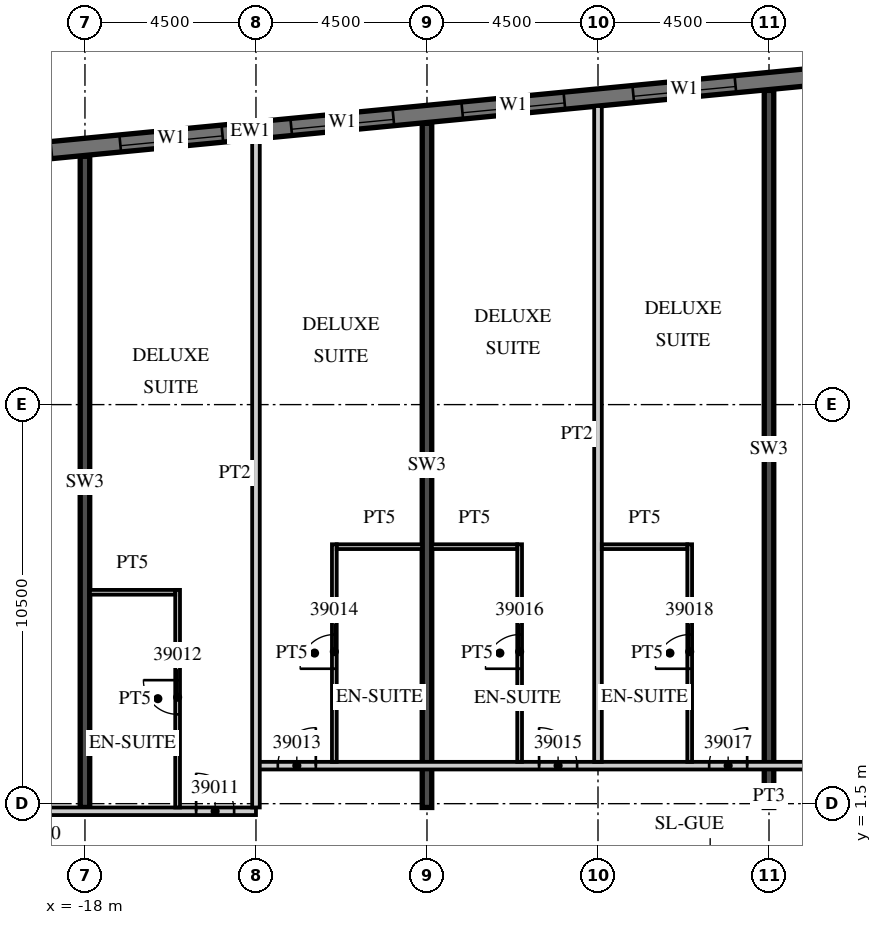
"""IFC4 building model, lengths in metres.
Left out: names, types, materials, properties, quantities, classifications, styles, units other than length and angle.
Written with IfcOpenShell. Run it as: python <this file> out.ifc"""

import sys

from ifc_helpers import new_model, si_unit, direction, frame, frame_2d, origin, place, context, subcontext, project, spatial, rectangle, extrude, element, fill, save


model = new_model("IFC4")
c1 = context("Model", 3, precision=1e-05, world=origin(), true_north=direction((0.0, 1.0)))
c2 = subcontext(c1, "Body", "Model", "MODEL_VIEW")
j1 = project(units=[si_unit("LENGTHUNIT", "METRE"), si_unit("PLANEANGLEUNIT", "RADIAN")], contexts=[c1])
p1 = place(None, origin())
s1 = spatial("IfcSite", under=j1, at=p1, CompositionType="ELEMENT")
p2 = place(p1, origin())
s2 = spatial("IfcBuilding", under=s1, at=p2, CompositionType="ELEMENT")
p3 = place(p2, frame((0.0, 0.0, 170.2)))
s3 = spatial("IfcBuildingStorey", under=s2, at=p3, CompositionType="ELEMENT", Elevation=170.2)
p4 = place(p3, frame((-18.0, 1.4, 0.0), z_axis=(0.0, 0.0, 1.0), x_axis=(0.0, 1.0, 0.0)))
e1 = element("IfcWall", 1, at=p4, inside=s3, PredefinedType="SHEAR", context=c2, shape_type="SweptSolid", body=[
    extrude(rectangle(XDim=17.134, YDim=0.25, at=frame_2d((8.567, 0.0))), origin(), (0.0, 0.0, 1.0), 3.3),
])
p5 = place(p3, frame((-9.0, 1.4, 0.0), z_axis=(0.0, 0.0, 1.0), x_axis=(0.0, 1.0, 0.0)))
e2 = element("IfcWall", 2, at=p5, inside=s3, PredefinedType="SHEAR", context=c2, shape_type="SweptSolid", body=[
    extrude(rectangle(XDim=18.001, YDim=0.25, at=frame_2d((9.0, 0.0))), origin(), (0.0, 0.0, 1.0), 3.3),
])
p6 = place(p3, frame((0.0, 1.4, 0.0), z_axis=(0.0, 0.0, 1.0), x_axis=(0.0, 1.0, 0.0)))
e3 = element("IfcWall", 3, at=p6, inside=s3, PredefinedType="SHEAR", context=c2, shape_type="SweptSolid", body=[
    extrude(rectangle(XDim=18.867, YDim=0.25, at=frame_2d((9.434, 0.0))), origin(), (0.0, 0.0, 1.0), 3.3),
])
p7 = place(p3, frame((13.521, 21.817, 0.0), z_axis=(0.0, 0.0, 1.0), x_axis=(-0.995396508751, -0.095842529008, 0.0)))
e4 = element("IfcWall", 4, at=p7, inside=s3, PredefinedType="SOLIDWALL", context=c2, shape_type="SweptSolid", body=[
    extrude(rectangle(XDim=54.591, YDim=0.45, at=frame_2d((27.296, 0.0))), origin(), (0.0, 0.0, 1.0), 3.02),
])
p8 = place(p7, frame((0.91, 0.0, 0.45)))
e5 = element("IfcOpeningElement", 5, at=p8, cuts=e4, PredefinedType="OPENING", context=c2, shape_type="SweptSolid", body=[
    extrude(rectangle(XDim=2.7, YDim=2.25, at=frame_2d((1.35, 1.125))), frame((0.0, 0.235, 0.0), z_axis=(0.0, -1.0, 0.0), x_axis=(1.0, 0.0, 0.0)), (0.0, 0.0, 1.0), 0.47),
])
p9 = place(p7, frame((5.431, 0.0, 0.45)))
e6 = element("IfcOpeningElement", 6, at=p9, cuts=e4, PredefinedType="OPENING", context=c2, shape_type="SweptSolid", body=[
    extrude(rectangle(XDim=2.7, YDim=2.25, at=frame_2d((1.35, 1.125))), frame((0.0, 0.235, 0.0), z_axis=(0.0, -1.0, 0.0), x_axis=(1.0, 0.0, 0.0)), (0.0, 0.0, 1.0), 0.47),
])
p10 = place(p7, frame((9.952, 0.0, 0.45)))
e7 = element("IfcOpeningElement", 7, at=p10, cuts=e4, PredefinedType="OPENING", context=c2, shape_type="SweptSolid", body=[
    extrude(rectangle(XDim=2.7, YDim=2.25, at=frame_2d((1.35, 1.125))), frame((0.0, 0.235, 0.0), z_axis=(0.0, -1.0, 0.0), x_axis=(1.0, 0.0, 0.0)), (0.0, 0.0, 1.0), 0.47),
])
p11 = place(p7, frame((14.473, 0.0, 0.45)))
e8 = element("IfcOpeningElement", 8, at=p11, cuts=e4, PredefinedType="OPENING", context=c2, shape_type="SweptSolid", body=[
    extrude(rectangle(XDim=2.7, YDim=2.25, at=frame_2d((1.35, 1.125))), frame((0.0, 0.235, 0.0), z_axis=(0.0, -1.0, 0.0), x_axis=(1.0, 0.0, 0.0)), (0.0, 0.0, 1.0), 0.47),
])
p12 = place(p7, frame((18.994, 0.0, 0.45)))
e9 = element("IfcOpeningElement", 9, at=p12, cuts=e4, PredefinedType="OPENING", context=c2, shape_type="SweptSolid", body=[
    extrude(rectangle(XDim=2.7, YDim=2.25, at=frame_2d((1.35, 1.125))), frame((0.0, 0.235, 0.0), z_axis=(0.0, -1.0, 0.0), x_axis=(1.0, 0.0, 0.0)), (0.0, 0.0, 1.0), 0.47),
])
p13 = place(p7, frame((23.514, 0.0, 0.45)))
e10 = element("IfcOpeningElement", 10, at=p13, cuts=e4, PredefinedType="OPENING", context=c2, shape_type="SweptSolid", body=[
    extrude(rectangle(XDim=2.7, YDim=2.25, at=frame_2d((1.35, 1.125))), frame((0.0, 0.235, 0.0), z_axis=(0.0, -1.0, 0.0), x_axis=(1.0, 0.0, 0.0)), (0.0, 0.0, 1.0), 0.47),
])
p14 = place(p7, frame((28.035, 0.0, 0.45)))
e11 = element("IfcOpeningElement", 11, at=p14, cuts=e4, PredefinedType="OPENING", context=c2, shape_type="SweptSolid", body=[
    extrude(rectangle(XDim=2.7, YDim=2.25, at=frame_2d((1.35, 1.125))), frame((0.0, 0.235, 0.0), z_axis=(0.0, -1.0, 0.0), x_axis=(1.0, 0.0, 0.0)), (0.0, 0.0, 1.0), 0.47),
])
p15 = place(p7, frame((32.556, 0.0, 0.45)))
e12 = element("IfcOpeningElement", 12, at=p15, cuts=e4, PredefinedType="OPENING", context=c2, shape_type="SweptSolid", body=[
    extrude(rectangle(XDim=2.7, YDim=2.25, at=frame_2d((1.35, 1.125))), frame((0.0, 0.235, 0.0), z_axis=(0.0, -1.0, 0.0), x_axis=(1.0, 0.0, 0.0)), (0.0, 0.0, 1.0), 0.47),
])
p16 = place(p7, frame((37.077, 0.0, 0.45)))
e13 = element("IfcOpeningElement", 13, at=p16, cuts=e4, PredefinedType="OPENING", context=c2, shape_type="SweptSolid", body=[
    extrude(rectangle(XDim=2.7, YDim=2.25, at=frame_2d((1.35, 1.125))), frame((0.0, 0.235, 0.0), z_axis=(0.0, -1.0, 0.0), x_axis=(1.0, 0.0, 0.0)), (0.0, 0.0, 1.0), 0.47),
])
p17 = place(p7, frame((41.598, 0.0, 0.45)))
e14 = element("IfcOpeningElement", 14, at=p17, cuts=e4, PredefinedType="OPENING", context=c2, shape_type="SweptSolid", body=[
    extrude(rectangle(XDim=2.7, YDim=2.25, at=frame_2d((1.35, 1.125))), frame((0.0, 0.235, 0.0), z_axis=(0.0, -1.0, 0.0), x_axis=(1.0, 0.0, 0.0)), (0.0, 0.0, 1.0), 0.47),
])
p18 = place(p7, frame((46.118, 0.0, 0.45)))
e15 = element("IfcOpeningElement", 15, at=p18, cuts=e4, PredefinedType="OPENING", context=c2, shape_type="SweptSolid", body=[
    extrude(rectangle(XDim=2.7, YDim=2.25, at=frame_2d((1.35, 1.125))), frame((0.0, 0.235, 0.0), z_axis=(0.0, -1.0, 0.0), x_axis=(1.0, 0.0, 0.0)), (0.0, 0.0, 1.0), 0.47),
])
p19 = place(p7, frame((50.629, 0.0, 0.45)))
e16 = element("IfcOpeningElement", 16, at=p19, cuts=e4, PredefinedType="OPENING", context=c2, shape_type="SweptSolid", body=[
    extrude(rectangle(XDim=2.7, YDim=2.25, at=frame_2d((1.35, 1.125))), frame((0.0, 0.235, 0.0), z_axis=(0.0, -1.0, 0.0), x_axis=(1.0, 0.0, 0.0)), (0.0, 0.0, 1.0), 0.47),
])
p20 = place(p3, frame((-42.913, 1.3, 0.0), z_axis=(0.0, 0.0, 1.0), x_axis=(1.0, 0.0, 0.0)))
e17 = element("IfcWall", 17, at=p20, inside=s3, PredefinedType="PARTITIONING", context=c2, shape_type="SweptSolid", body=[
    extrude(rectangle(XDim=29.413, YDim=0.2, at=frame_2d((14.707, 0.0))), origin(), (0.0, 0.0, 1.0), 3.02),
])
p21 = place(p20, frame((0.15, 0.0, 0.0)))
e18 = element("IfcOpeningElement", 18, at=p21, cuts=e17, PredefinedType="OPENING", context=c2, shape_type="SweptSolid", body=[
    extrude(rectangle(XDim=0.9, YDim=2.1, at=frame_2d((0.45, 1.05))), frame((0.0, 0.11, 0.0), z_axis=(0.0, -1.0, 0.0), x_axis=(1.0, 0.0, 0.0)), (0.0, 0.0, 1.0), 0.22),
])
p22 = place(p20, frame((5.338, 0.0, 0.0)))
e19 = element("IfcOpeningElement", 19, at=p22, cuts=e17, PredefinedType="OPENING", context=c2, shape_type="SweptSolid", body=[
    extrude(rectangle(XDim=1.0, YDim=2.1, at=frame_2d((0.5, 1.05))), frame((0.0, 0.11, 0.0), z_axis=(0.0, -1.0, 0.0), x_axis=(1.0, 0.0, 0.0)), (0.0, 0.0, 1.0), 0.22),
])
p23 = place(p20, frame((7.488, 0.0, 0.0)))
e20 = element("IfcOpeningElement", 20, at=p23, cuts=e17, PredefinedType="OPENING", context=c2, shape_type="SweptSolid", body=[
    extrude(rectangle(XDim=1.0, YDim=2.1, at=frame_2d((0.5, 1.05))), frame((0.0, 0.11, 0.0), z_axis=(0.0, -1.0, 0.0), x_axis=(1.0, 0.0, 0.0)), (0.0, 0.0, 1.0), 0.22),
])
p24 = place(p20, frame((11.963, 0.0, 0.0)))
e21 = element("IfcOpeningElement", 21, at=p24, cuts=e17, PredefinedType="OPENING", context=c2, shape_type="SweptSolid", body=[
    extrude(rectangle(XDim=1.0, YDim=2.1, at=frame_2d((0.5, 1.05))), frame((0.0, 0.11, 0.0), z_axis=(0.0, -1.0, 0.0), x_axis=(1.0, 0.0, 0.0)), (0.0, 0.0, 1.0), 0.22),
])
p25 = place(p20, frame((21.275, 0.0, 0.0)))
e22 = element("IfcOpeningElement", 22, at=p25, cuts=e17, PredefinedType="OPENING", context=c2, shape_type="SweptSolid", body=[
    extrude(rectangle(XDim=1.2, YDim=2.1, at=frame_2d((0.6, 1.05))), frame((0.0, 0.11, 0.0), z_axis=(0.0, -1.0, 0.0), x_axis=(1.0, 0.0, 0.0)), (0.0, 0.0, 1.0), 0.22),
])
p26 = place(p20, frame((27.838, 0.0, 0.0)))
e23 = element("IfcOpeningElement", 23, at=p26, cuts=e17, PredefinedType="OPENING", context=c2, shape_type="SweptSolid", body=[
    extrude(rectangle(XDim=1.0, YDim=2.1, at=frame_2d((0.5, 1.05))), frame((0.0, 0.11, 0.0), z_axis=(0.0, -1.0, 0.0), x_axis=(1.0, 0.0, 0.0)), (0.0, 0.0, 1.0), 0.22),
])
p27 = place(p3, frame((-13.5, 2.5, 0.0), z_axis=(0.0, 0.0, 1.0), x_axis=(1.0, 0.0, 0.0)))
e24 = element("IfcWall", 24, at=p27, inside=s3, PredefinedType="PARTITIONING", context=c2, shape_type="SweptSolid", body=[
    extrude(rectangle(XDim=27.0, YDim=0.2, at=frame_2d((13.5, 0.0))), origin(), (0.0, 0.0, 1.0), 3.02),
])
p28 = place(p27, frame((0.575, 0.0, 0.0)))
e25 = element("IfcOpeningElement", 25, at=p28, cuts=e24, PredefinedType="OPENING", context=c2, shape_type="SweptSolid", body=[
    extrude(rectangle(XDim=1.0, YDim=2.1, at=frame_2d((0.5, 1.05))), frame((0.0, 0.11, 0.0), z_axis=(0.0, -1.0, 0.0), x_axis=(1.0, 0.0, 0.0)), (0.0, 0.0, 1.0), 0.22),
])
p29 = place(p27, frame((7.45, 0.0, 0.0)))
e26 = element("IfcOpeningElement", 26, at=p29, cuts=e24, PredefinedType="OPENING", context=c2, shape_type="SweptSolid", body=[
    extrude(rectangle(XDim=1.0, YDim=2.1, at=frame_2d((0.5, 1.05))), frame((0.0, 0.11, 0.0), z_axis=(0.0, -1.0, 0.0), x_axis=(1.0, 0.0, 0.0)), (0.0, 0.0, 1.0), 0.22),
])
p30 = place(p27, frame((11.925, 0.0, 0.0)))
e27 = element("IfcOpeningElement", 27, at=p30, cuts=e24, PredefinedType="OPENING", context=c2, shape_type="SweptSolid", body=[
    extrude(rectangle(XDim=1.0, YDim=2.1, at=frame_2d((0.5, 1.05))), frame((0.0, 0.11, 0.0), z_axis=(0.0, -1.0, 0.0), x_axis=(1.0, 0.0, 0.0)), (0.0, 0.0, 1.0), 0.22),
])
p31 = place(p27, frame((15.938, 0.0, 0.0)))
e28 = element("IfcOpeningElement", 28, at=p31, cuts=e24, PredefinedType="OPENING", context=c2, shape_type="SweptSolid", body=[
    extrude(rectangle(XDim=1.2, YDim=2.1, at=frame_2d((0.6, 1.05))), frame((0.0, 0.11, 0.0), z_axis=(0.0, -1.0, 0.0), x_axis=(1.0, 0.0, 0.0)), (0.0, 0.0, 1.0), 0.22),
])
p32 = place(p27, frame((25.425, 0.0, 0.0)))
e29 = element("IfcOpeningElement", 29, at=p32, cuts=e24, PredefinedType="OPENING", context=c2, shape_type="SweptSolid", body=[
    extrude(rectangle(XDim=1.0, YDim=2.1, at=frame_2d((0.5, 1.05))), frame((0.0, 0.11, 0.0), z_axis=(0.0, -1.0, 0.0), x_axis=(1.0, 0.0, 0.0)), (0.0, 0.0, 1.0), 0.22),
])
p33 = place(p3, frame((-13.5, 1.4, 0.0), z_axis=(0.0, 0.0, 1.0), x_axis=(0.0, 1.0, 0.0)))
e30 = element("IfcWall", 30, at=p33, inside=s3, PredefinedType="PARTITIONING", context=c2, shape_type="SweptSolid", body=[
    extrude(rectangle(XDim=17.59, YDim=0.2, at=frame_2d((8.795, 0.0))), origin(), (0.0, 0.0, 1.0), 3.02),
])
p34 = place(p3, frame((-15.562, 1.4, 0.0), z_axis=(0.0, 0.0, 1.0), x_axis=(0.0, 1.0, 0.0)))
e31 = element("IfcWall", 31, at=p34, inside=s3, PredefinedType="PARTITIONING", context=c2, shape_type="SweptSolid", body=[
    extrude(rectangle(XDim=5.725, YDim=0.125, at=frame_2d((2.863, 0.0))), origin(), (0.0, 0.0, 1.0), 3.02),
])
p35 = place(p34, frame((2.45, 0.0, 0.0)))
e32 = element("IfcOpeningElement", 32, at=p35, cuts=e31, PredefinedType="OPENING", context=c2, shape_type="SweptSolid", body=[
    extrude(rectangle(XDim=0.9, YDim=2.1, at=frame_2d((0.45, 1.05))), frame((0.0, 0.073, 0.0), z_axis=(0.0, -1.0, 0.0), x_axis=(1.0, 0.0, 0.0)), (0.0, 0.0, 1.0), 0.145),
])
p36 = place(p3, frame((-17.875, 7.062, 0.0), z_axis=(0.0, 0.0, 1.0), x_axis=(1.0, 0.0, 0.0)))
e33 = element("IfcWall", 33, at=p36, inside=s3, PredefinedType="PARTITIONING", context=c2, shape_type="SweptSolid", body=[
    extrude(rectangle(XDim=2.25, YDim=0.125, at=frame_2d((1.125, 0.0))), origin(), (0.0, 0.0, 1.0), 3.02),
])
p37 = place(p3, frame((-11.438, 2.6, 0.0), z_axis=(0.0, 0.0, 1.0), x_axis=(0.0, 1.0, 0.0)))
e34 = element("IfcWall", 34, at=p37, inside=s3, PredefinedType="PARTITIONING", context=c2, shape_type="SweptSolid", body=[
    extrude(rectangle(XDim=5.725, YDim=0.125, at=frame_2d((2.862, 0.0))), origin(), (0.0, 0.0, 1.0), 3.02),
])
p38 = place(p37, frame((2.45, 0.0, 0.0)))
e35 = element("IfcOpeningElement", 35, at=p38, cuts=e34, PredefinedType="OPENING", context=c2, shape_type="SweptSolid", body=[
    extrude(rectangle(XDim=0.9, YDim=2.1, at=frame_2d((0.45, 1.05))), frame((0.0, 0.073, 0.0), z_axis=(0.0, -1.0, 0.0), x_axis=(1.0, 0.0, 0.0)), (0.0, 0.0, 1.0), 0.145),
])
p39 = place(p3, frame((-11.375, 8.262, 0.0), z_axis=(0.0, 0.0, 1.0), x_axis=(1.0, 0.0, 0.0)))
e36 = element("IfcWall", 36, at=p39, inside=s3, PredefinedType="PARTITIONING", context=c2, shape_type="SweptSolid", body=[
    extrude(rectangle(XDim=2.25, YDim=0.125, at=frame_2d((1.125, 0.0))), origin(), (0.0, 0.0, 1.0), 3.02),
])
p40 = place(p3, frame((-4.5, 2.6, 0.0), z_axis=(0.0, 0.0, 1.0), x_axis=(0.0, 1.0, 0.0)))
e37 = element("IfcWall", 37, at=p40, inside=s3, PredefinedType="PARTITIONING", context=c2, shape_type="SweptSolid", body=[
    extrude(rectangle(XDim=17.256, YDim=0.2, at=frame_2d((8.628, 0.0))), origin(), (0.0, 0.0, 1.0), 3.02),
])
p41 = place(p3, frame((-6.562, 2.6, 0.0), z_axis=(0.0, 0.0, 1.0), x_axis=(0.0, 1.0, 0.0)))
e38 = element("IfcWall", 38, at=p41, inside=s3, PredefinedType="PARTITIONING", context=c2, shape_type="SweptSolid", body=[
    extrude(rectangle(XDim=5.725, YDim=0.125, at=frame_2d((2.862, 0.0))), origin(), (0.0, 0.0, 1.0), 3.02),
])
p42 = place(p41, frame((2.45, 0.0, 0.0)))
e39 = element("IfcOpeningElement", 39, at=p42, cuts=e38, PredefinedType="OPENING", context=c2, shape_type="SweptSolid", body=[
    extrude(rectangle(XDim=0.9, YDim=2.1, at=frame_2d((0.45, 1.05))), frame((0.0, 0.073, 0.0), z_axis=(0.0, -1.0, 0.0), x_axis=(1.0, 0.0, 0.0)), (0.0, 0.0, 1.0), 0.145),
])
p43 = place(p3, frame((-8.875, 8.262, 0.0), z_axis=(0.0, 0.0, 1.0), x_axis=(1.0, 0.0, 0.0)))
e40 = element("IfcWall", 40, at=p43, inside=s3, PredefinedType="PARTITIONING", context=c2, shape_type="SweptSolid", body=[
    extrude(rectangle(XDim=2.25, YDim=0.125, at=frame_2d((1.125, 0.0))), origin(), (0.0, 0.0, 1.0), 3.02),
])
p44 = place(p3, frame((-2.087, 2.6, 0.0), z_axis=(0.0, 0.0, 1.0), x_axis=(0.0, 1.0, 0.0)))
e41 = element("IfcWall", 41, at=p44, inside=s3, PredefinedType="PARTITIONING", context=c2, shape_type="SweptSolid", body=[
    extrude(rectangle(XDim=5.725, YDim=0.125, at=frame_2d((2.862, 0.0))), origin(), (0.0, 0.0, 1.0), 3.02),
])
p45 = place(p44, frame((2.45, 0.0, 0.0)))
e42 = element("IfcOpeningElement", 42, at=p45, cuts=e41, PredefinedType="OPENING", context=c2, shape_type="SweptSolid", body=[
    extrude(rectangle(XDim=0.9, YDim=2.1, at=frame_2d((0.45, 1.05))), frame((0.0, 0.073, 0.0), z_axis=(0.0, -1.0, 0.0), x_axis=(1.0, 0.0, 0.0)), (0.0, 0.0, 1.0), 0.145),
])
p46 = place(p3, frame((-4.4, 8.262, 0.0), z_axis=(0.0, 0.0, 1.0), x_axis=(1.0, 0.0, 0.0)))
e43 = element("IfcWall", 43, at=p46, inside=s3, PredefinedType="PARTITIONING", context=c2, shape_type="SweptSolid", body=[
    extrude(rectangle(XDim=2.25, YDim=0.125, at=frame_2d((1.125, 0.0))), origin(), (0.0, 0.0, 1.0), 3.02),
])
p47 = place(p11, origin())
e44 = element("IfcWindow", 44, at=p47, inside=s3, PartitioningType="SINGLE_PANEL", PredefinedType="WINDOW", context=c2, shape_type="SweptSolid", body=[
    extrude(rectangle(XDim=2.7, YDim=2.25, at=frame_2d((1.35, 1.125))), frame((0.0, 0.09, 0.0), z_axis=(0.0, -1.0, 0.0), x_axis=(1.0, 0.0, 0.0)), (0.0, 0.0, 1.0), 0.06),
])
fill(e8, e44)
p48 = place(p12, origin())
e45 = element("IfcWindow", 45, at=p48, inside=s3, PartitioningType="SINGLE_PANEL", PredefinedType="WINDOW", context=c2, shape_type="SweptSolid", body=[
    extrude(rectangle(XDim=2.7, YDim=2.25, at=frame_2d((1.35, 1.125))), frame((0.0, 0.09, 0.0), z_axis=(0.0, -1.0, 0.0), x_axis=(1.0, 0.0, 0.0)), (0.0, 0.0, 1.0), 0.06),
])
fill(e9, e45)
p49 = place(p13, origin())
e46 = element("IfcWindow", 46, at=p49, inside=s3, PartitioningType="SINGLE_PANEL", PredefinedType="WINDOW", context=c2, shape_type="SweptSolid", body=[
    extrude(rectangle(XDim=2.7, YDim=2.25, at=frame_2d((1.35, 1.125))), frame((0.0, 0.09, 0.0), z_axis=(0.0, -1.0, 0.0), x_axis=(1.0, 0.0, 0.0)), (0.0, 0.0, 1.0), 0.06),
])
fill(e10, e46)
p50 = place(p14, origin())
e47 = element("IfcWindow", 47, at=p50, inside=s3, PartitioningType="SINGLE_PANEL", PredefinedType="WINDOW", context=c2, shape_type="SweptSolid", body=[
    extrude(rectangle(XDim=2.7, YDim=2.25, at=frame_2d((1.35, 1.125))), frame((0.0, 0.09, 0.0), z_axis=(0.0, -1.0, 0.0), x_axis=(1.0, 0.0, 0.0)), (0.0, 0.0, 1.0), 0.06),
])
fill(e11, e47)
p51 = place(p26, origin())
e48 = element("IfcDoor", 48, at=p51, inside=s3, OperationType="SINGLE_SWING_LEFT", PredefinedType="DOOR", context=c2, shape_type="SweptSolid", body=[
    extrude(rectangle(XDim=1.0, YDim=2.1, at=frame_2d((0.5, 1.05))), frame((0.0, 0.025, 0.0), z_axis=(0.0, -1.0, 0.0), x_axis=(1.0, 0.0, 0.0)), (0.0, 0.0, 1.0), 0.05),
])
fill(e23, e48)
p52 = place(p35, origin())
e49 = element("IfcDoor", 49, at=p52, inside=s3, OperationType="SINGLE_SWING_RIGHT", PredefinedType="DOOR", context=c2, shape_type="SweptSolid", body=[
    extrude(rectangle(XDim=0.9, YDim=2.1, at=frame_2d((0.45, 1.05))), frame((0.0, 0.025, 0.0), z_axis=(0.0, -1.0, 0.0), x_axis=(1.0, 0.0, 0.0)), (0.0, 0.0, 1.0), 0.05),
])
fill(e32, e49)
p53 = place(p28, origin())
e50 = element("IfcDoor", 50, at=p53, inside=s3, OperationType="SINGLE_SWING_RIGHT", PredefinedType="DOOR", context=c2, shape_type="SweptSolid", body=[
    extrude(rectangle(XDim=1.0, YDim=2.1, at=frame_2d((0.5, 1.05))), frame((0.0, 0.025, 0.0), z_axis=(0.0, -1.0, 0.0), x_axis=(1.0, 0.0, 0.0)), (0.0, 0.0, 1.0), 0.05),
])
fill(e25, e50)
p54 = place(p38, origin())
e51 = element("IfcDoor", 51, at=p54, inside=s3, OperationType="SINGLE_SWING_LEFT", PredefinedType="DOOR", context=c2, shape_type="SweptSolid", body=[
    extrude(rectangle(XDim=0.9, YDim=2.1, at=frame_2d((0.45, 1.05))), frame((0.0, 0.025, 0.0), z_axis=(0.0, -1.0, 0.0), x_axis=(1.0, 0.0, 0.0)), (0.0, 0.0, 1.0), 0.05),
])
fill(e35, e51)
p55 = place(p29, origin())
e52 = element("IfcDoor", 52, at=p55, inside=s3, OperationType="SINGLE_SWING_LEFT", PredefinedType="DOOR", context=c2, shape_type="SweptSolid", body=[
    extrude(rectangle(XDim=1.0, YDim=2.1, at=frame_2d((0.5, 1.05))), frame((0.0, 0.025, 0.0), z_axis=(0.0, -1.0, 0.0), x_axis=(1.0, 0.0, 0.0)), (0.0, 0.0, 1.0), 0.05),
])
fill(e26, e52)
p56 = place(p42, origin())
e53 = element("IfcDoor", 53, at=p56, inside=s3, OperationType="SINGLE_SWING_LEFT", PredefinedType="DOOR", context=c2, shape_type="SweptSolid", body=[
    extrude(rectangle(XDim=0.9, YDim=2.1, at=frame_2d((0.45, 1.05))), frame((0.0, 0.025, 0.0), z_axis=(0.0, -1.0, 0.0), x_axis=(1.0, 0.0, 0.0)), (0.0, 0.0, 1.0), 0.05),
])
fill(e39, e53)
p57 = place(p30, origin())
e54 = element("IfcDoor", 54, at=p57, inside=s3, OperationType="SINGLE_SWING_RIGHT", PredefinedType="DOOR", context=c2, shape_type="SweptSolid", body=[
    extrude(rectangle(XDim=1.0, YDim=2.1, at=frame_2d((0.5, 1.05))), frame((0.0, 0.025, 0.0), z_axis=(0.0, -1.0, 0.0), x_axis=(1.0, 0.0, 0.0)), (0.0, 0.0, 1.0), 0.05),
])
fill(e27, e54)
p58 = place(p45, origin())
e55 = element("IfcDoor", 55, at=p58, inside=s3, OperationType="SINGLE_SWING_LEFT", PredefinedType="DOOR", context=c2, shape_type="SweptSolid", body=[
    extrude(rectangle(XDim=0.9, YDim=2.1, at=frame_2d((0.45, 1.05))), frame((0.0, 0.025, 0.0), z_axis=(0.0, -1.0, 0.0), x_axis=(1.0, 0.0, 0.0)), (0.0, 0.0, 1.0), 0.05),
])
fill(e42, e55)
save(model, sys.argv[1])
